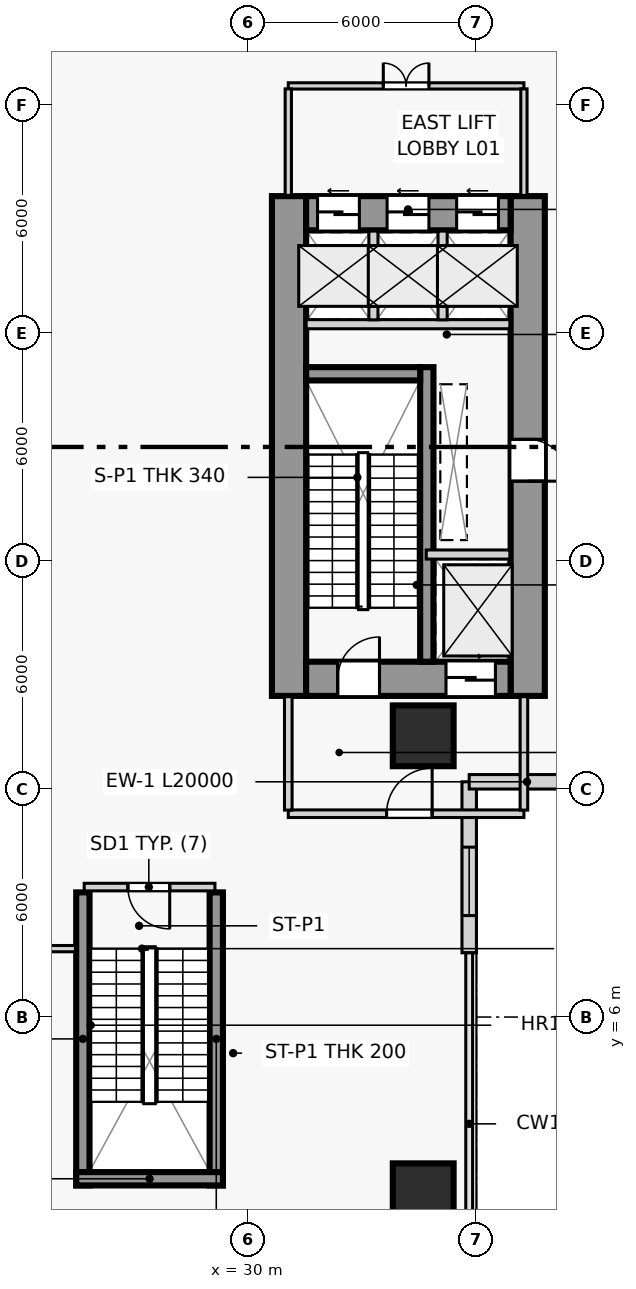
"""IFC4 building model, lengths in metres.
Left out: names, types, materials, properties, quantities, classifications, styles, units other than length and angle.
Written with IfcOpenShell. Run it as: python <this file> out.ifc"""

import sys

from ifc_helpers import new_model, si_unit, direction, frame, frame_2d, origin, origin_2d, place, context, subcontext, project, spatial, rectangle, extrude, source, transform, mapped, element, fill, save


model = new_model("IFC4")
c1 = context("Model", 3, precision=1e-05, world=origin(), true_north=direction((0.0, 1.0)))
c2 = subcontext(c1, "Body", "Model", "MODEL_VIEW")
j1 = project(units=[si_unit("LENGTHUNIT", "METRE"), si_unit("PLANEANGLEUNIT", "RADIAN")], contexts=[c1])
p1 = place(None, origin())
s1 = spatial("IfcSite", under=j1, at=p1, CompositionType="ELEMENT")
p2 = place(p1, origin())
s2 = spatial("IfcBuilding", under=s1, at=p2, CompositionType="ELEMENT")
p3 = place(p2, frame((0.0, 0.0, 4.5)))
s3 = spatial("IfcBuildingStorey", under=s2, at=p3, CompositionType="ELEMENT", Elevation=4.5)
p4 = place(p3, frame((31.07, 14.45, 0.0), z_axis=(0.0, 0.0, 1.0), x_axis=(0.0, 1.0, 0.0)))
e1 = element("IfcWall", 1, at=p4, inside=s3, PredefinedType="SHEAR", context=c2, shape_type="SweptSolid", body=[
    extrude(rectangle(XDim=13.15, YDim=0.9, at=frame_2d((6.575, 0.0))), origin(), (0.0, 0.0, 1.0), 4.5),
])
p5 = place(p3, frame((37.35, 14.45, 0.0), z_axis=(0.0, 0.0, 1.0), x_axis=(0.0, 1.0, 0.0)))
e2 = element("IfcWall", 2, at=p5, inside=s3, PredefinedType="SHEAR", context=c2, shape_type="SweptSolid", body=[
    extrude(rectangle(XDim=13.15, YDim=0.9, at=frame_2d((6.575, 0.0))), origin(), (0.0, 0.0, 1.0), 4.5),
])
p6 = place(p5, frame((5.65, 0.0, 0.0)))
e3 = element("IfcOpeningElement", 3, at=p6, cuts=e2, PredefinedType="OPENING", context=c2, shape_type="SweptSolid", body=[
    extrude(rectangle(XDim=1.1, YDim=2.2, at=frame_2d((0.55, 1.1))), frame((0.0, 0.46, 0.0), z_axis=(0.0, -1.0, 0.0), x_axis=(1.0, 0.0, 0.0)), (0.0, 0.0, 1.0), 0.92),
])
p7 = place(p3, frame((31.52, 14.9, 0.0), z_axis=(0.0, 0.0, 1.0), x_axis=(1.0, 0.0, 0.0)))
e4 = element("IfcWall", 4, at=p7, inside=s3, PredefinedType="SHEAR", context=c2, shape_type="SweptSolid", body=[
    extrude(rectangle(XDim=5.38, YDim=0.9, at=frame_2d((2.69, 0.0))), origin(), (0.0, 0.0, 1.0), 4.5),
])
p8 = place(p7, frame((0.83, 0.0, 0.0)))
e5 = element("IfcOpeningElement", 5, at=p8, cuts=e4, PredefinedType="OPENING", context=c2, shape_type="SweptSolid", body=[
    extrude(rectangle(XDim=1.1, YDim=2.2, at=frame_2d((0.55, 1.1))), frame((0.0, 0.46, 0.0), z_axis=(0.0, -1.0, 0.0), x_axis=(1.0, 0.0, 0.0)), (0.0, 0.0, 1.0), 0.92),
])
p9 = place(p7, frame((3.68, 0.0, 0.0)))
e6 = element("IfcOpeningElement", 6, at=p9, cuts=e4, PredefinedType="OPENING", context=c2, shape_type="SweptSolid", body=[
    extrude(rectangle(XDim=1.3, YDim=2.2, at=frame_2d((0.65, 1.1))), frame((0.0, 0.46, 0.0), z_axis=(0.0, -1.0, 0.0), x_axis=(1.0, 0.0, 0.0)), (0.0, 0.0, 1.0), 0.92),
])
p10 = place(p3, frame((31.52, 27.15, 0.0), z_axis=(0.0, 0.0, 1.0), x_axis=(1.0, 0.0, 0.0)))
e7 = element("IfcWall", 7, at=p10, inside=s3, PredefinedType="SHEAR", context=c2, shape_type="SweptSolid", body=[
    extrude(rectangle(XDim=5.38, YDim=0.9, at=frame_2d((2.69, 0.0))), origin(), (0.0, 0.0, 1.0), 4.5),
])
p11 = place(p10, frame((0.3, 0.0, 0.0)))
e8 = element("IfcOpeningElement", 8, at=p11, cuts=e7, PredefinedType="OPENING", context=c2, shape_type="SweptSolid", body=[
    extrude(rectangle(XDim=1.1, YDim=2.2, at=frame_2d((0.55, 1.1))), frame((0.0, 0.46, 0.0), z_axis=(0.0, -1.0, 0.0), x_axis=(1.0, 0.0, 0.0)), (0.0, 0.0, 1.0), 0.92),
])
p12 = place(p10, frame((2.13, 0.0, 0.0)))
e9 = element("IfcOpeningElement", 9, at=p12, cuts=e7, PredefinedType="OPENING", context=c2, shape_type="SweptSolid", body=[
    extrude(rectangle(XDim=1.1, YDim=2.2, at=frame_2d((0.55, 1.1))), frame((0.0, 0.46, 0.0), z_axis=(0.0, -1.0, 0.0), x_axis=(1.0, 0.0, 0.0)), (0.0, 0.0, 1.0), 0.92),
])
p13 = place(p10, frame((3.96, 0.0, 0.0)))
e10 = element("IfcOpeningElement", 10, at=p13, cuts=e7, PredefinedType="OPENING", context=c2, shape_type="SweptSolid", body=[
    extrude(rectangle(XDim=1.1, YDim=2.2, at=frame_2d((0.55, 1.1))), frame((0.0, 0.46, 0.0), z_axis=(0.0, -1.0, 0.0), x_axis=(1.0, 0.0, 0.0)), (0.0, 0.0, 1.0), 0.92),
])
p14 = place(p3, frame((34.695, 15.35, 0.0), z_axis=(0.0, 0.0, 1.0), x_axis=(0.0, 1.0, 0.0)))
e11 = element("IfcWall", 11, at=p14, inside=s3, PredefinedType="SHEAR", context=c2, shape_type="SweptSolid", body=[
    extrude(rectangle(XDim=7.75, YDim=0.35, at=frame_2d((3.875, 0.0))), origin(), (0.0, 0.0, 1.0), 4.5),
])
p15 = place(p3, frame((31.52, 22.925, 0.0), z_axis=(0.0, 0.0, 1.0), x_axis=(1.0, 0.0, 0.0)))
e12 = element("IfcWall", 12, at=p15, inside=s3, PredefinedType="SHEAR", context=c2, shape_type="SweptSolid", body=[
    extrude(rectangle(XDim=3.0, YDim=0.35, at=frame_2d((1.5, 0.0))), origin(), (0.0, 0.0, 1.0), 4.5),
])
for number, where, z_axis, x_axis in (
    (13, (25.645, 1.57, 0.0), (0.0, 0.0, 1.0), (0.0, 1.0, 0.0)),
    (14, (29.155, 1.57, 0.0), (0.0, 0.0, 1.0), (0.0, 1.0, 0.0)),
):
    element("IfcWall", number, at=place(p3, frame(where, z_axis=z_axis, x_axis=x_axis)), inside=s3, PredefinedType="SHEAR", context=c2, shape_type="SweptSolid", body=[
        extrude(rectangle(XDim=7.71, YDim=0.35, at=frame_2d((3.855, 0.0))), origin(), (0.0, 0.0, 1.0), 4.5),
    ])
p16 = place(p3, frame((25.47, 1.745, 0.0), z_axis=(0.0, 0.0, 1.0), x_axis=(1.0, 0.0, 0.0)))
e15 = element("IfcWall", 15, at=p16, inside=s3, PredefinedType="SHEAR", context=c2, shape_type="SweptSolid", body=[
    extrude(rectangle(XDim=3.86, YDim=0.35, at=frame_2d((1.93, 0.0))), origin(), (0.0, 0.0, 1.0), 4.5),
])
m1 = source(origin(), c2, "Body", "SweptSolid", [
    extrude(rectangle(XDim=1.6, YDim=1.6, at=origin_2d()), origin(), (0.0, 0.0, 1.0), 4.5),
])
for number, where, z_axis, x_axis in (
    (16, (34.6, 1.35, 0.0), (0.0, 0.0, 1.0), (1.0, 0.0, 0.0)),
    (17, (34.6, 13.4, 0.0), (0.0, 0.0, 1.0), (1.0, 0.0, 0.0)),
):
    element("IfcColumn", number, at=place(p3, frame(where, z_axis=z_axis, x_axis=x_axis)), inside=s3, PredefinedType="COLUMN", context=c2, shape_type="MappedRepresentation", body=[
        mapped(m1, transform((0.0, 0.0, 0.0), scale=1.0)),
    ])
p17 = place(p3, frame((35.81, 7.69, 0.0), z_axis=(0.0, 0.0, 1.0), x_axis=(0.0, 1.0, 0.0)))
e18 = element("IfcWall", 18, at=p17, inside=s3, PredefinedType="SOLIDWALL", context=c2, shape_type="SweptSolid", body=[
    extrude(rectangle(XDim=4.5, YDim=0.38, at=frame_2d((2.25, 0.0))), origin(), (0.0, 0.0, 1.0), 4.16),
])
p18 = place(p17, frame((0.98, 0.0, 0.8)))
e19 = element("IfcOpeningElement", 19, at=p18, cuts=e18, PredefinedType="OPENING", context=c2, shape_type="SweptSolid", body=[
    extrude(rectangle(XDim=1.8, YDim=2.1, at=frame_2d((0.9, 1.05))), frame((0.0, 0.2, 0.0), z_axis=(0.0, -1.0, 0.0), x_axis=(1.0, 0.0, 0.0)), (0.0, 0.0, 1.0), 0.4),
])
p19 = place(p3, frame((35.81, 12.19, 0.0), z_axis=(0.0, 0.0, 1.0), x_axis=(1.0, 0.0, 0.0)))
e20 = element("IfcWall", 20, at=p19, inside=s3, PredefinedType="SOLIDWALL", context=c2, shape_type="SweptSolid", body=[
    extrude(rectangle(XDim=20.0, YDim=0.38, at=frame_2d((10.0, 0.0))), origin(), (0.0, 0.0, 1.0), 4.16),
])
p20 = place(p19, frame((3.042, 0.0, 0.8)))
e21 = element("IfcOpeningElement", 21, at=p20, cuts=e20, PredefinedType="OPENING", context=c2, shape_type="SweptSolid", body=[
    extrude(rectangle(XDim=1.8, YDim=2.1, at=frame_2d((0.9, 1.05))), frame((0.0, 0.2, 0.0), z_axis=(0.0, -1.0, 0.0), x_axis=(1.0, 0.0, 0.0)), (0.0, 0.0, 1.0), 0.4),
])
p21 = place(p19, frame((7.528, 0.0, 0.8)))
e22 = element("IfcOpeningElement", 22, at=p21, cuts=e20, PredefinedType="OPENING", context=c2, shape_type="SweptSolid", body=[
    extrude(rectangle(XDim=1.8, YDim=2.1, at=frame_2d((0.9, 1.05))), frame((0.0, 0.2, 0.0), z_axis=(0.0, -1.0, 0.0), x_axis=(1.0, 0.0, 0.0)), (0.0, 0.0, 1.0), 0.4),
])
p22 = place(p19, frame((12.012, 0.0, 0.8)))
e23 = element("IfcOpeningElement", 23, at=p22, cuts=e20, PredefinedType="OPENING", context=c2, shape_type="SweptSolid", body=[
    extrude(rectangle(XDim=1.8, YDim=2.1, at=frame_2d((0.9, 1.05))), frame((0.0, 0.2, 0.0), z_axis=(0.0, -1.0, 0.0), x_axis=(1.0, 0.0, 0.0)), (0.0, 0.0, 1.0), 0.4),
])
p23 = place(p19, frame((16.498, 0.0, 0.8)))
e24 = element("IfcOpeningElement", 24, at=p23, cuts=e20, PredefinedType="OPENING", context=c2, shape_type="SweptSolid", body=[
    extrude(rectangle(XDim=1.8, YDim=2.1, at=frame_2d((0.9, 1.05))), frame((0.0, 0.2, 0.0), z_axis=(0.0, -1.0, 0.0), x_axis=(1.0, 0.0, 0.0)), (0.0, 0.0, 1.0), 0.4),
])
p24 = place(p3, frame((34.68, 18.17, 0.0), z_axis=(0.0, 0.0, 1.0), x_axis=(1.0, 0.0, 0.0)))
e25 = element("IfcWall", 25, at=p24, inside=s3, PredefinedType="PARTITIONING", context=c2, shape_type="SweptSolid", body=[
    extrude(rectangle(XDim=2.2, YDim=0.24, at=frame_2d((1.1, 0.0))), origin(), (0.0, 0.0, 1.0), 4.16),
])
p25 = place(p3, frame((31.05, 11.35, 0.0), z_axis=(0.0, 0.0, 1.0), x_axis=(1.0, 0.0, 0.0)))
e26 = element("IfcWall", 26, at=p25, inside=s3, PredefinedType="PARTITIONING", context=c2, shape_type="SweptSolid", body=[
    extrude(rectangle(XDim=6.2, YDim=0.2, at=frame_2d((3.1, 0.0))), origin(), (0.0, 0.0, 1.0), 4.16),
])
p26 = place(p25, frame((2.586, 0.0, 0.0)))
e27 = element("IfcOpeningElement", 27, at=p26, cuts=e26, PredefinedType="OPENING", context=c2, shape_type="SweptSolid", body=[
    extrude(rectangle(XDim=1.2, YDim=2.2, at=frame_2d((0.6, 1.1))), frame((0.0, 0.11, 0.0), z_axis=(0.0, -1.0, 0.0), x_axis=(1.0, 0.0, 0.0)), (0.0, 0.0, 1.0), 0.22),
])
for number, where, z_axis, x_axis in (
    (28, (31.05, 11.445, 0.0), (0.0, 0.0, 1.0), (0.0, 1.0, 0.0)),
    (29, (37.25, 11.445, 0.0), (0.0, 0.0, 1.0), (0.0, 1.0, 0.0)),
):
    element("IfcWall", number, at=place(p3, frame(where, z_axis=z_axis, x_axis=x_axis)), inside=s3, PredefinedType="PARTITIONING", context=c2, shape_type="SweptSolid", body=[
        extrude(rectangle(XDim=2.985, YDim=0.2, at=frame_2d((1.492, 0.0))), origin(), (0.0, 0.0, 1.0), 4.16),
    ])
p27 = place(p3, frame((31.52, 24.23, 0.0), z_axis=(0.0, 0.0, 1.0), x_axis=(1.0, 0.0, 0.0)))
e30 = element("IfcWall", 30, at=p27, inside=s3, PredefinedType="PARTITIONING", context=c2, shape_type="SweptSolid", body=[
    extrude(rectangle(XDim=5.36, YDim=0.24, at=frame_2d((2.68, 0.0))), origin(), (0.0, 0.0, 1.0), 4.16),
])
for number, where, z_axis, x_axis in (
    (31, (33.29, 24.345, 0.0), (0.0, 0.0, 1.0), (0.0, 1.0, 0.0)),
    (32, (35.11, 24.345, 0.0), (0.0, 0.0, 1.0), (0.0, 1.0, 0.0)),
):
    element("IfcWall", number, at=place(p3, frame(where, z_axis=z_axis, x_axis=x_axis)), inside=s3, PredefinedType="PARTITIONING", context=c2, shape_type="SweptSolid", body=[
        extrude(rectangle(XDim=2.335, YDim=0.24, at=frame_2d((1.167, 0.0))), origin(), (0.0, 0.0, 1.0), 4.16),
    ])
p28 = place(p3, frame((31.05, 30.5, 0.0), z_axis=(0.0, 0.0, 1.0), x_axis=(1.0, 0.0, 0.0)))
e33 = element("IfcWall", 33, at=p28, inside=s3, PredefinedType="PARTITIONING", context=c2, shape_type="SweptSolid", body=[
    extrude(rectangle(XDim=6.2, YDim=0.165, at=frame_2d((3.1, 0.0))), origin(), (0.0, 0.0, 1.0), 4.16),
])
p29 = place(p28, frame((2.5, 0.0, 0.0)))
e34 = element("IfcOpeningElement", 34, at=p29, cuts=e33, PredefinedType="OPENING", context=c2, shape_type="SweptSolid", body=[
    extrude(rectangle(XDim=1.2, YDim=2.2, at=frame_2d((0.6, 1.1))), frame((0.0, 0.093, 0.0), z_axis=(0.0, -1.0, 0.0), x_axis=(1.0, 0.0, 0.0)), (0.0, 0.0, 1.0), 0.185),
])
for number, where, z_axis, x_axis in (
    (35, (31.05, 27.62, 0.0), (0.0, 0.0, 1.0), (0.0, 1.0, 0.0)),
    (36, (37.25, 27.62, 0.0), (0.0, 0.0, 1.0), (0.0, 1.0, 0.0)),
):
    element("IfcWall", number, at=place(p3, frame(where, z_axis=z_axis, x_axis=x_axis)), inside=s3, PredefinedType="PARTITIONING", context=c2, shape_type="SweptSolid", body=[
        extrude(rectangle(XDim=2.802, YDim=0.165, at=frame_2d((1.401, 0.0))), origin(), (0.0, 0.0, 1.0), 4.16),
    ])
p30 = place(p3, frame((25.68, 9.42, 0.0), z_axis=(0.0, 0.0, 1.0), x_axis=(1.0, 0.0, 0.0)))
e37 = element("IfcWall", 37, at=p30, inside=s3, PredefinedType="PARTITIONING", context=c2, shape_type="SweptSolid", body=[
    extrude(rectangle(XDim=3.44, YDim=0.2, at=frame_2d((1.72, 0.0))), origin(), (0.0, 0.0, 1.0), 4.16),
])
p31 = place(p30, frame((1.15, 0.0, 0.0)))
e38 = element("IfcOpeningElement", 38, at=p31, cuts=e37, PredefinedType="OPENING", context=c2, shape_type="SweptSolid", body=[
    extrude(rectangle(XDim=1.1, YDim=2.2, at=frame_2d((0.55, 1.1))), frame((0.0, 0.11, 0.0), z_axis=(0.0, -1.0, 0.0), x_axis=(1.0, 0.0, 0.0)), (0.0, 0.0, 1.0), 0.22),
])
p32 = place(p3, frame((0.185, 7.8, 0.0), z_axis=(0.0, 0.0, 1.0), x_axis=(1.0, 0.0, 0.0)))
e39 = element("IfcWall", 39, at=p32, inside=s3, PredefinedType="PARTITIONING", context=c2, shape_type="SweptSolid", body=[
    extrude(rectangle(XDim=25.265, YDim=0.165, at=frame_2d((12.632, 0.0))), origin(), (0.0, 0.0, 1.0), 4.16),
])
p33 = place(p32, frame((5.44, 0.0, 0.0)))
e40 = element("IfcOpeningElement", 40, at=p33, cuts=e39, PredefinedType="OPENING", context=c2, shape_type="SweptSolid", body=[
    extrude(rectangle(XDim=1.25, YDim=2.2, at=frame_2d((0.625, 1.1))), frame((0.0, 0.093, 0.0), z_axis=(0.0, -1.0, 0.0), x_axis=(1.0, 0.0, 0.0)), (0.0, 0.0, 1.0), 0.185),
])
p34 = place(p32, frame((17.165, 0.0, 0.0)))
e41 = element("IfcOpeningElement", 41, at=p34, cuts=e39, PredefinedType="OPENING", context=c2, shape_type="SweptSolid", body=[
    extrude(rectangle(XDim=1.25, YDim=2.2, at=frame_2d((0.625, 1.1))), frame((0.0, 0.093, 0.0), z_axis=(0.0, -1.0, 0.0), x_axis=(1.0, 0.0, 0.0)), (0.0, 0.0, 1.0), 0.185),
])
m2 = source(origin(), c2, "Body", "SweptSolid", [
    extrude(rectangle(XDim=1.8, YDim=2.1, at=frame_2d((0.9, 1.05))), frame((0.0, 0.03, 0.0), z_axis=(0.0, -1.0, 0.0), x_axis=(1.0, 0.0, 0.0)), (0.0, 0.0, 1.0), 0.06),
])
p35 = place(p18, origin())
e42 = element("IfcWindow", 42, at=p35, inside=s3, PartitioningType="SINGLE_PANEL", PredefinedType="WINDOW", context=c2, shape_type="MappedRepresentation", body=[
    mapped(m2, transform((0.0, 0.0, 0.0), scale=1.0)),
])
fill(e19, e42)
m3 = source(origin(), c2, "Body", "SweptSolid", [
    extrude(rectangle(XDim=1.1, YDim=2.2, at=frame_2d((0.55, 1.1))), frame((0.0, 0.025, 0.0), z_axis=(0.0, -1.0, 0.0), x_axis=(1.0, 0.0, 0.0)), (0.0, 0.0, 1.0), 0.05),
])
p36 = place(p8, origin())
e43 = element("IfcDoor", 43, at=p36, inside=s3, OperationType="SINGLE_SWING_RIGHT", PredefinedType="DOOR", context=c2, shape_type="MappedRepresentation", body=[
    mapped(m3, transform((0.0, 0.0, 0.0), scale=1.0)),
])
fill(e5, e43)
m4 = source(origin(), c2, "Body", "SweptSolid", [
    extrude(rectangle(XDim=1.3, YDim=2.2, at=frame_2d((0.65, 1.1))), frame((0.0, 0.025, 0.0), z_axis=(0.0, -1.0, 0.0), x_axis=(1.0, 0.0, 0.0)), (0.0, 0.0, 1.0), 0.05),
])
p37 = place(p9, origin())
e44 = element("IfcDoor", 44, at=p37, inside=s3, OperationType="SLIDING_TO_RIGHT", PredefinedType="DOOR", context=c2, shape_type="MappedRepresentation", body=[
    mapped(m4, transform((0.0, 0.0, 0.0), scale=1.0)),
])
fill(e6, e44)
m5 = source(origin(), c2, "Body", "SweptSolid", [
    extrude(rectangle(XDim=1.2, YDim=2.2, at=frame_2d((0.6, 1.1))), frame((0.0, 0.025, 0.0), z_axis=(0.0, -1.0, 0.0), x_axis=(1.0, 0.0, 0.0)), (0.0, 0.0, 1.0), 0.05),
])
p38 = place(p26, origin())
e45 = element("IfcDoor", 45, at=p38, inside=s3, OperationType="SINGLE_SWING_RIGHT", PredefinedType="DOOR", context=c2, shape_type="MappedRepresentation", body=[
    mapped(m5, transform((0.0, 0.0, 0.0), scale=1.0)),
])
fill(e27, e45)
m6 = source(origin(), c2, "Body", "SweptSolid", [
    extrude(rectangle(XDim=1.1, YDim=2.2, at=frame_2d((0.55, 1.1))), frame((0.0, 0.025, 0.0), z_axis=(0.0, -1.0, 0.0), x_axis=(1.0, 0.0, 0.0)), (0.0, 0.0, 1.0), 0.05),
])
p39 = place(p11, origin())
e46 = element("IfcDoor", 46, at=p39, inside=s3, OperationType="SLIDING_TO_LEFT", PredefinedType="DOOR", context=c2, shape_type="MappedRepresentation", body=[
    mapped(m6, transform((0.0, 0.0, 0.0), scale=1.0)),
])
fill(e8, e46)
p40 = place(p12, origin())
e47 = element("IfcDoor", 47, at=p40, inside=s3, OperationType="SLIDING_TO_LEFT", PredefinedType="DOOR", context=c2, shape_type="MappedRepresentation", body=[
    mapped(m6, transform((0.0, 0.0, 0.0), scale=1.0)),
])
fill(e9, e47)
p41 = place(p13, origin())
e48 = element("IfcDoor", 48, at=p41, inside=s3, OperationType="SLIDING_TO_LEFT", PredefinedType="DOOR", context=c2, shape_type="MappedRepresentation", body=[
    mapped(m6, transform((0.0, 0.0, 0.0), scale=1.0)),
])
fill(e10, e48)
p42 = place(p29, origin())
e49 = element("IfcDoor", 49, at=p42, inside=s3, OperationType="DOUBLE_DOOR_SINGLE_SWING", PredefinedType="DOOR", context=c2, shape_type="MappedRepresentation", body=[
    mapped(m5, transform((0.0, 0.0, 0.0), scale=1.0)),
])
fill(e34, e49)
p43 = place(p6, frame((1.1, 0.0, 0.0), z_axis=(0.0, 0.0, 1.0), x_axis=(-1.0, 0.0, 0.0)))
e50 = element("IfcDoor", 50, at=p43, inside=s3, OperationType="SINGLE_SWING_RIGHT", PredefinedType="DOOR", context=c2, shape_type="MappedRepresentation", body=[
    mapped(m3, transform((0.0, 0.0, 0.0), scale=1.0)),
])
fill(e3, e50)
p44 = place(p31, frame((1.1, 0.0, 0.0), z_axis=(0.0, 0.0, 1.0), x_axis=(-1.0, 0.0, 0.0)))
e51 = element("IfcDoor", 51, at=p44, inside=s3, OperationType="SINGLE_SWING_LEFT", PredefinedType="DOOR", context=c2, shape_type="MappedRepresentation", body=[
    mapped(m3, transform((0.0, 0.0, 0.0), scale=1.0)),
])
fill(e38, e51)
save(model, sys.argv[1])
